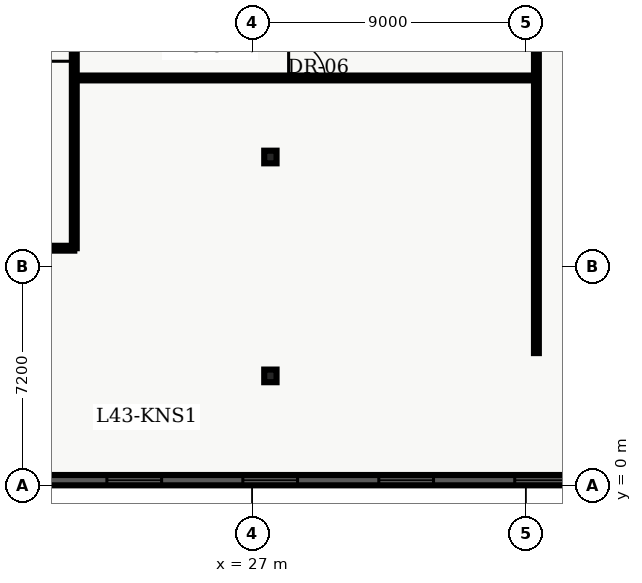
"""IFC4 building model, lengths in metres.
Left out: names, types, materials, properties, quantities, classifications, styles, units other than length and angle.
Written with IfcOpenShell. Run it as: python <this file> out.ifc"""

import sys

from ifc_helpers import new_model, entity, si_unit, converted_unit, direction, frame, origin_with_axes, origin_2d_with_axis, place, context, subcontext, project, spatial, polyline, rectangle, i_section, outline, extrude, element, fill, save


model = new_model("IFC4")
c1 = context("Model", 3, precision=1e-05, world=origin_with_axes(), true_north=direction((0.0, 1.0)))
c2 = subcontext(c1, "Body", "Model", "MODEL_VIEW")
j1 = project(units=[si_unit("LENGTHUNIT", "METRE"), converted_unit("PLANEANGLEUNIT", "DEGREE", entity("IfcPlaneAngleMeasure", 0.017), si_unit("PLANEANGLEUNIT", "RADIAN"), dimensions=[0, 0, 0, 0, 0, 0, 0])], contexts=[c1])
p1 = place(None, origin_with_axes())
s1 = spatial("IfcSite", under=j1, at=p1, CompositionType="ELEMENT")
p2 = place(p1, origin_with_axes())
s2 = spatial("IfcBuilding", under=s1, at=p2, CompositionType="ELEMENT")
p3 = place(p2, frame((0.0, 0.0, 175.8), z_axis=(0.0, 0.0, 1.0), x_axis=(1.0, 0.0, 0.0)))
s3 = spatial("IfcBuildingStorey", under=s2, at=p3, CompositionType="ELEMENT", Elevation=175.8)
for number, where, z_axis, x_axis in (
    (1, (27.6, 3.6, 0.0), (0.0, 0.0, 1.0), (1.0, 0.0, 0.0)),
    (2, (27.6, 10.8, 0.0), (0.0, 0.0, 1.0), (1.0, 0.0, 0.0)),
):
    element("IfcColumn", number, at=place(p3, frame(where, z_axis=z_axis, x_axis=x_axis)), inside=s3, PredefinedType="COLUMN", context=c2, shape_type="SweptSolid", body=[
        extrude(i_section(OverallWidth=0.406, OverallDepth=0.416, WebThickness=0.03, FlangeThickness=0.048, FilletRadius=0.022, at=origin_2d_with_axis()), origin_with_axes(), (0.0, 0.0, 1.0), 3.9),
    ])
p4 = place(p3, frame((2.6, 7.8, 0.0), z_axis=(0.0, 0.0, 1.0), x_axis=(1.0, 0.0, 0.0)))
e3 = element("IfcWall", 3, at=p4, inside=s3, PredefinedType="PARTITIONING", context=c2, shape_type="SweptSolid", body=[
    extrude(outline(polyline([(0.0, -0.08), (18.55, -0.08), (18.55, 0.08), (0.0, 0.08), (0.0, -0.08)])), origin_with_axes(), (0.0, 0.0, 1.0), 2.7),
])
p5 = place(p4, frame((9.245, 0.0, 0.0), z_axis=(0.0, 0.0, 1.0), x_axis=(1.0, 0.0, 0.0)))
e4 = element("IfcOpeningElement", 4, at=p5, cuts=e3, PredefinedType="OPENING", context=c2, shape_type="SweptSolid", body=[
    extrude(rectangle(XDim=1.0, YDim=0.18, at=origin_2d_with_axis()), origin_with_axes(), (0.0, 0.0, 1.0), 2.15),
])
p6 = place(p3, frame((21.15, 7.8, 0.0), z_axis=(0.0, 0.0, 1.0), x_axis=(0.0, 1.0, 0.0)))
e5 = element("IfcWall", 5, at=p6, inside=s3, PredefinedType="PARTITIONING", context=c2, shape_type="SweptSolid", body=[
    extrude(outline(polyline([(0.0, -0.08), (32.7, -0.08), (32.7, 0.08), (0.0, 0.08), (0.0, -0.08)])), origin_with_axes(), (0.0, 0.0, 1.0), 2.7),
])
p7 = place(p6, frame((16.557, 0.0, 0.0), z_axis=(0.0, 0.0, 1.0), x_axis=(1.0, 0.0, 0.0)))
e6 = element("IfcOpeningElement", 6, at=p7, cuts=e5, PredefinedType="OPENING", context=c2, shape_type="SweptSolid", body=[
    extrude(rectangle(XDim=1.0, YDim=0.18, at=origin_2d_with_axis()), origin_with_axes(), (0.0, 0.0, 1.0), 2.15),
])
p8 = place(p6, frame((22.185, 0.0, 0.0), z_axis=(0.0, 0.0, 1.0), x_axis=(1.0, 0.0, 0.0)))
e7 = element("IfcOpeningElement", 7, at=p8, cuts=e5, PredefinedType="OPENING", context=c2, shape_type="SweptSolid", body=[
    extrude(rectangle(XDim=1.0, YDim=0.18, at=origin_2d_with_axis()), origin_with_axes(), (0.0, 0.0, 1.0), 2.15),
])
p9 = place(p6, frame((26.91, 0.0, 0.0), z_axis=(0.0, 0.0, 1.0), x_axis=(1.0, 0.0, 0.0)))
e8 = element("IfcOpeningElement", 8, at=p9, cuts=e5, PredefinedType="OPENING", context=c2, shape_type="SweptSolid", body=[
    extrude(rectangle(XDim=1.0, YDim=0.18, at=origin_2d_with_axis()), origin_with_axes(), (0.0, 0.0, 1.0), 2.15),
])
p10 = place(p6, frame((30.602, 0.0, 0.0), z_axis=(0.0, 0.0, 1.0), x_axis=(1.0, 0.0, 0.0)))
e9 = element("IfcOpeningElement", 9, at=p10, cuts=e5, PredefinedType="OPENING", context=c2, shape_type="SweptSolid", body=[
    extrude(rectangle(XDim=1.0, YDim=0.18, at=origin_2d_with_axis()), origin_with_axes(), (0.0, 0.0, 1.0), 2.15),
])
p11 = place(p6, frame((6.675, 0.0, 0.0), z_axis=(0.0, 0.0, 1.0), x_axis=(1.0, 0.0, 0.0)))
e10 = element("IfcOpeningElement", 10, at=p11, cuts=e5, PredefinedType="OPENING", context=c2, shape_type="SweptSolid", body=[
    extrude(rectangle(XDim=1.05, YDim=0.18, at=origin_2d_with_axis()), origin_with_axes(), (0.0, 0.0, 1.0), 2.15),
])
p12 = place(p3, frame((21.15, 13.4, 0.0), z_axis=(0.0, 0.0, 1.0), x_axis=(1.0, 0.0, 0.0)))
e11 = element("IfcWall", 11, at=p12, inside=s3, PredefinedType="PARTITIONING", context=c2, shape_type="SweptSolid", body=[
    extrude(outline(polyline([(0.0, -0.08), (15.2, -0.08), (15.2, 0.08), (0.0, 0.08), (0.0, -0.08)])), origin_with_axes(), (0.0, 0.0, 1.0), 2.7),
])
p13 = place(p12, frame((7.65, 0.0, 0.0), z_axis=(0.0, 0.0, 1.0), x_axis=(1.0, 0.0, 0.0)))
e12 = element("IfcOpeningElement", 12, at=p13, cuts=e11, PredefinedType="OPENING", context=c2, shape_type="SweptSolid", body=[
    extrude(rectangle(XDim=1.2, YDim=0.18, at=origin_2d_with_axis()), origin_with_axes(), (0.0, 0.0, 1.0), 2.2),
])
p14 = place(p3, frame((36.35, 4.35, 0.0), z_axis=(0.0, 0.0, 1.0), x_axis=(0.0, 1.0, 0.0)))
e13 = element("IfcWall", 13, at=p14, inside=s3, PredefinedType="PARTITIONING", context=c2, shape_type="SweptSolid", body=[
    extrude(outline(polyline([(0.0, -0.08), (16.95, -0.08), (16.95, 0.08), (0.0, 0.08), (0.0, -0.08)])), origin_with_axes(), (0.0, 0.0, 1.0), 2.7),
])
p15 = place(p3, frame((57.26, 0.17, 0.0), z_axis=(0.0, 0.0, 1.0), x_axis=(-1.0, 0.0, 0.0)))
e14 = element("IfcWall", 14, at=p15, inside=s3, PredefinedType="SOLIDWALL", context=c2, shape_type="SweptSolid", body=[
    extrude(outline(polyline([(0.0, -0.17), (54.86, -0.17), (54.86, 0.17), (0.0, 0.17), (0.0, -0.17)])), origin_with_axes(), (0.0, 0.0, 1.0), 3.66),
])
p16 = place(p15, frame((2.836, 0.0, 0.45), z_axis=(0.0, 0.0, 1.0), x_axis=(1.0, 0.0, 0.0)))
e15 = element("IfcOpeningElement", 15, at=p16, cuts=e14, PredefinedType="OPENING", context=c2, shape_type="SweptSolid", body=[
    extrude(rectangle(XDim=1.8, YDim=0.36, at=origin_2d_with_axis()), origin_with_axes(), (0.0, 0.0, 1.0), 2.1),
])
p17 = place(p15, frame((7.307, 0.0, 0.45), z_axis=(0.0, 0.0, 1.0), x_axis=(1.0, 0.0, 0.0)))
e16 = element("IfcOpeningElement", 16, at=p17, cuts=e14, PredefinedType="OPENING", context=c2, shape_type="SweptSolid", body=[
    extrude(rectangle(XDim=1.8, YDim=0.36, at=origin_2d_with_axis()), origin_with_axes(), (0.0, 0.0, 1.0), 2.1),
])
p18 = place(p15, frame((11.779, 0.0, 0.45), z_axis=(0.0, 0.0, 1.0), x_axis=(1.0, 0.0, 0.0)))
e17 = element("IfcOpeningElement", 17, at=p18, cuts=e14, PredefinedType="OPENING", context=c2, shape_type="SweptSolid", body=[
    extrude(rectangle(XDim=1.8, YDim=0.36, at=origin_2d_with_axis()), origin_with_axes(), (0.0, 0.0, 1.0), 2.1),
])
p19 = place(p15, frame((16.251, 0.0, 0.45), z_axis=(0.0, 0.0, 1.0), x_axis=(1.0, 0.0, 0.0)))
e18 = element("IfcOpeningElement", 18, at=p19, cuts=e14, PredefinedType="OPENING", context=c2, shape_type="SweptSolid", body=[
    extrude(rectangle(XDim=1.8, YDim=0.36, at=origin_2d_with_axis()), origin_with_axes(), (0.0, 0.0, 1.0), 2.1),
])
p20 = place(p15, frame((20.723, 0.0, 0.45), z_axis=(0.0, 0.0, 1.0), x_axis=(1.0, 0.0, 0.0)))
e19 = element("IfcOpeningElement", 19, at=p20, cuts=e14, PredefinedType="OPENING", context=c2, shape_type="SweptSolid", body=[
    extrude(rectangle(XDim=1.8, YDim=0.36, at=origin_2d_with_axis()), origin_with_axes(), (0.0, 0.0, 1.0), 2.1),
])
p21 = place(p15, frame((25.194, 0.0, 0.45), z_axis=(0.0, 0.0, 1.0), x_axis=(1.0, 0.0, 0.0)))
e20 = element("IfcOpeningElement", 20, at=p21, cuts=e14, PredefinedType="OPENING", context=c2, shape_type="SweptSolid", body=[
    extrude(rectangle(XDim=1.8, YDim=0.36, at=origin_2d_with_axis()), origin_with_axes(), (0.0, 0.0, 1.0), 2.1),
])
p22 = place(p15, frame((29.666, 0.0, 0.45), z_axis=(0.0, 0.0, 1.0), x_axis=(1.0, 0.0, 0.0)))
e21 = element("IfcOpeningElement", 21, at=p22, cuts=e14, PredefinedType="OPENING", context=c2, shape_type="SweptSolid", body=[
    extrude(rectangle(XDim=1.8, YDim=0.36, at=origin_2d_with_axis()), origin_with_axes(), (0.0, 0.0, 1.0), 2.1),
])
p23 = place(p15, frame((34.138, 0.0, 0.45), z_axis=(0.0, 0.0, 1.0), x_axis=(1.0, 0.0, 0.0)))
e22 = element("IfcOpeningElement", 22, at=p23, cuts=e14, PredefinedType="OPENING", context=c2, shape_type="SweptSolid", body=[
    extrude(rectangle(XDim=1.8, YDim=0.36, at=origin_2d_with_axis()), origin_with_axes(), (0.0, 0.0, 1.0), 2.1),
])
p24 = place(p15, frame((38.609, 0.0, 0.45), z_axis=(0.0, 0.0, 1.0), x_axis=(1.0, 0.0, 0.0)))
e23 = element("IfcOpeningElement", 23, at=p24, cuts=e14, PredefinedType="OPENING", context=c2, shape_type="SweptSolid", body=[
    extrude(rectangle(XDim=1.8, YDim=0.36, at=origin_2d_with_axis()), origin_with_axes(), (0.0, 0.0, 1.0), 2.1),
])
p25 = place(p15, frame((43.081, 0.0, 0.45), z_axis=(0.0, 0.0, 1.0), x_axis=(1.0, 0.0, 0.0)))
e24 = element("IfcOpeningElement", 24, at=p25, cuts=e14, PredefinedType="OPENING", context=c2, shape_type="SweptSolid", body=[
    extrude(rectangle(XDim=1.8, YDim=0.36, at=origin_2d_with_axis()), origin_with_axes(), (0.0, 0.0, 1.0), 2.1),
])
p26 = place(p15, frame((47.553, 0.0, 0.45), z_axis=(0.0, 0.0, 1.0), x_axis=(1.0, 0.0, 0.0)))
e25 = element("IfcOpeningElement", 25, at=p26, cuts=e14, PredefinedType="OPENING", context=c2, shape_type="SweptSolid", body=[
    extrude(rectangle(XDim=1.8, YDim=0.36, at=origin_2d_with_axis()), origin_with_axes(), (0.0, 0.0, 1.0), 2.1),
])
p27 = place(p15, frame((52.024, 0.0, 0.45), z_axis=(0.0, 0.0, 1.0), x_axis=(1.0, 0.0, 0.0)))
e26 = element("IfcOpeningElement", 26, at=p27, cuts=e14, PredefinedType="OPENING", context=c2, shape_type="SweptSolid", body=[
    extrude(rectangle(XDim=1.8, YDim=0.36, at=origin_2d_with_axis()), origin_with_axes(), (0.0, 0.0, 1.0), 2.1),
])
p28 = place(p6, frame((6.675, 0.0, 0.0), z_axis=(0.0, 0.0, 1.0), x_axis=(1.0, 0.0, 0.0)))
e27 = element("IfcDoor", 27, at=p28, inside=s3, OperationType="SINGLE_SWING_LEFT", PredefinedType="DOOR", context=c2, shape_type="SweptSolid", body=[
    extrude(rectangle(XDim=1.05, YDim=0.09, at=origin_2d_with_axis()), origin_with_axes(), (0.0, 0.0, 1.0), 2.15),
])
fill(e10, e27)
p29 = place(p12, frame((7.65, 0.0, 0.0), z_axis=(0.0, 0.0, 1.0), x_axis=(1.0, 0.0, 0.0)))
e28 = element("IfcDoor", 28, at=p29, inside=s3, OperationType="SINGLE_SWING_LEFT", PredefinedType="DOOR", context=c2, shape_type="SweptSolid", body=[
    extrude(rectangle(XDim=1.2, YDim=0.09, at=origin_2d_with_axis()), origin_with_axes(), (0.0, 0.0, 1.0), 2.2),
])
fill(e12, e28)
p30 = place(p15, frame((20.723, 0.0, 0.45), z_axis=(0.0, 0.0, 1.0), x_axis=(1.0, 0.0, 0.0)))
e29 = element("IfcWindow", 29, at=p30, inside=s3, PredefinedType="WINDOW", context=c2, shape_type="SweptSolid", body=[
    extrude(rectangle(XDim=1.8, YDim=0.09, at=origin_2d_with_axis()), origin_with_axes(), (0.0, 0.0, 1.0), 2.1),
])
fill(e19, e29)
p31 = place(p15, frame((25.194, 0.0, 0.45), z_axis=(0.0, 0.0, 1.0), x_axis=(1.0, 0.0, 0.0)))
e30 = element("IfcWindow", 30, at=p31, inside=s3, PredefinedType="WINDOW", context=c2, shape_type="SweptSolid", body=[
    extrude(rectangle(XDim=1.8, YDim=0.09, at=origin_2d_with_axis()), origin_with_axes(), (0.0, 0.0, 1.0), 2.1),
])
fill(e20, e30)
p32 = place(p15, frame((29.666, 0.0, 0.45), z_axis=(0.0, 0.0, 1.0), x_axis=(1.0, 0.0, 0.0)))
e31 = element("IfcWindow", 31, at=p32, inside=s3, PredefinedType="WINDOW", context=c2, shape_type="SweptSolid", body=[
    extrude(rectangle(XDim=1.8, YDim=0.09, at=origin_2d_with_axis()), origin_with_axes(), (0.0, 0.0, 1.0), 2.1),
])
fill(e21, e31)
p33 = place(p15, frame((34.138, 0.0, 0.45), z_axis=(0.0, 0.0, 1.0), x_axis=(1.0, 0.0, 0.0)))
e32 = element("IfcWindow", 32, at=p33, inside=s3, PredefinedType="WINDOW", context=c2, shape_type="SweptSolid", body=[
    extrude(rectangle(XDim=1.8, YDim=0.09, at=origin_2d_with_axis()), origin_with_axes(), (0.0, 0.0, 1.0), 2.1),
])
fill(e22, e32)
save(model, sys.argv[1])
